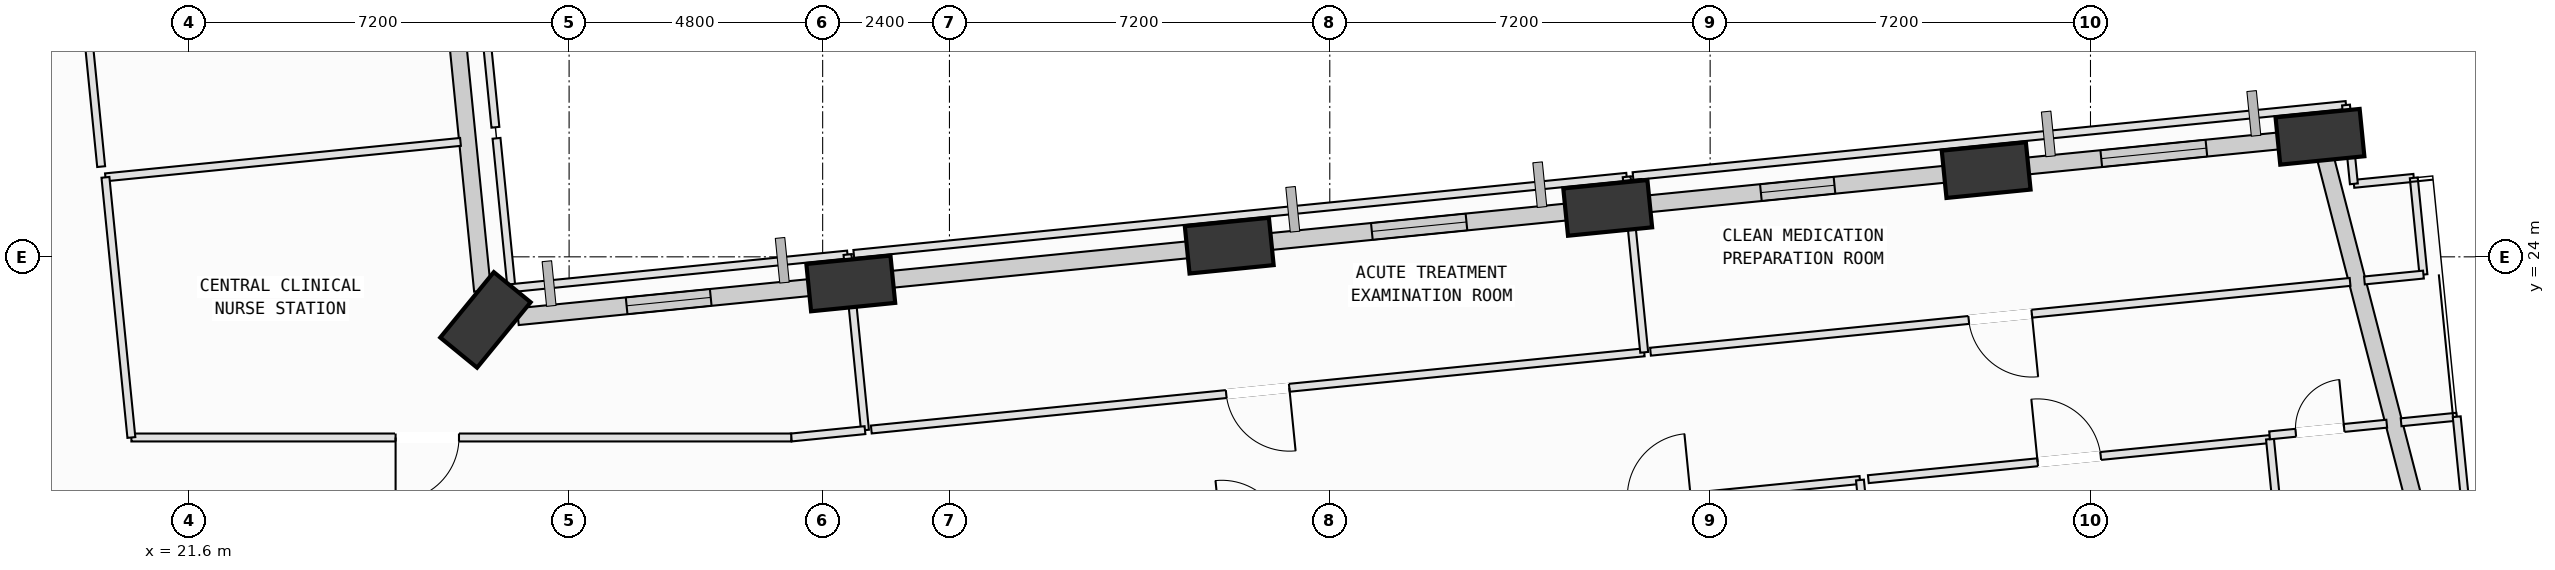
"""IFC4 building model, lengths in metres.
Left out: names, types, materials, properties, quantities, classifications, styles, units other than length and angle.
Written with IfcOpenShell. Run it as: python <this file> out.ifc"""

import sys

from ifc_helpers import new_model, si_unit, direction, frame, frame_2d, origin, origin_2d, place, context, subcontext, project, spatial, rectangle, extrude, element, fill, save


model = new_model("IFC4")
c1 = context("Model", 3, precision=1e-05, world=origin(), true_north=direction((0.0, 1.0)))
c2 = subcontext(c1, "Body", "Model", "MODEL_VIEW")
j1 = project(units=[si_unit("LENGTHUNIT", "METRE"), si_unit("PLANEANGLEUNIT", "RADIAN")], contexts=[c1])
p1 = place(None, origin())
s1 = spatial("IfcSite", under=j1, at=p1, CompositionType="ELEMENT")
p2 = place(p1, origin())
s2 = spatial("IfcBuilding", under=s1, at=p2, CompositionType="ELEMENT")
p3 = place(p2, frame((0.0, 0.0, 47.0)))
s3 = spatial("IfcBuildingStorey", under=s2, at=p3, CompositionType="ELEMENT", Elevation=47.0)
p4 = place(p3, frame((61.944, 26.273, 0.002), z_axis=(-0.007037616646, 0.116606027529, 0.993153314597), x_axis=(-0.987305751047, -0.158406878966, 0.011602355177)))
e1 = element("IfcColumn", 1, at=p4, inside=s3, PredefinedType="COLUMN", context=c2, shape_type="SweptSolid", body=[
    extrude(rectangle(XDim=1.6, YDim=0.9, at=origin_2d()), origin(), (0.0, 0.0, 1.0), 4.024),
])
p5 = place(p3, frame((55.625, 25.642, 0.002), z_axis=(-0.004197545486, 0.090885984878, 0.995852458131), x_axis=(-0.989432855337, -0.144709945545, 0.009036395335)))
e2 = element("IfcColumn", 2, at=p5, inside=s3, PredefinedType="COLUMN", context=c2, shape_type="SweptSolid", body=[
    extrude(rectangle(XDim=1.6, YDim=0.9, at=origin_2d()), origin(), (0.0, 0.0, 1.0), 4.013),
])
p6 = place(p3, frame((48.461, 24.927, 0.002), z_axis=(-0.001036521292, 0.061459615457, 0.998109032767), x_axis=(-0.993242457555, -0.115897149318, 0.00610502167)))
e3 = element("IfcColumn", 3, at=p6, inside=s3, PredefinedType="COLUMN", context=c2, shape_type="SweptSolid", body=[
    extrude(rectangle(XDim=1.6, YDim=0.9, at=origin_2d()), origin(), (0.0, 0.0, 1.0), 4.004),
])
p7 = place(p3, frame((41.296, 24.212, 0.002), z_axis=(0.002198022253, 0.031871322671, 0.999489563472), x_axis=(-0.99952753356, -0.030571913774, 0.00317297069)))
e4 = element("IfcColumn", 4, at=p7, inside=s3, PredefinedType="COLUMN", context=c2, shape_type="SweptSolid", body=[
    extrude(rectangle(XDim=1.6, YDim=0.9, at=origin_2d()), origin(), (0.0, 0.0, 1.0), 3.999),
])
p8 = place(p3, frame((34.132, 23.496, 0.002), z_axis=(0.00537559583, 0.002260193701, 0.999982997102), x_axis=(-0.477226844935, 0.878779951426, 0.000579175574)))
e5 = element("IfcColumn", 5, at=p8, inside=s3, PredefinedType="COLUMN", context=c2, shape_type="SweptSolid", body=[
    extrude(rectangle(XDim=1.6, YDim=0.9, at=origin_2d()), origin(), (0.0, 0.0, 1.0), 3.997),
])
p9 = place(p3, frame((27.217, 22.806, 0.002), z_axis=(0.008487881416, -0.026379602675, 0.999615962473), x_axis=(0.366006606198, 0.930365147227, 0.021444277663)))
e6 = element("IfcColumn", 6, at=p9, inside=s3, PredefinedType="COLUMN", context=c2, shape_type="SweptSolid", body=[
    extrude(rectangle(XDim=1.6, YDim=0.9, at=origin_2d()), origin(), (0.0, 0.0, 1.0), 3.998),
])
p10 = place(p3, frame((62.038, 25.909, 0.0), z_axis=(0.0, 0.0, 1.0), x_axis=(0.250203731226, -0.968193210512, 0.0)))
e7 = element("IfcWall", 7, at=p10, inside=s3, PredefinedType="SOLIDWALL", context=c2, shape_type="SweptSolid", body=[
    extrude(rectangle(XDim=8.614, YDim=0.32, at=frame_2d((4.307, 0.0))), origin(), (0.0, 0.0, 1.0), 3.165),
])
p11 = place(p3, frame((56.212, 25.7, 0.0), z_axis=(0.0, 0.0, 1.0), x_axis=(0.995056197677, 0.099313460641, 0.0)))
e8 = element("IfcWall", 8, at=p11, inside=s3, PredefinedType="SOLIDWALL", context=c2, shape_type="SweptSolid", body=[
    extrude(rectangle(XDim=5.209, YDim=0.32, at=frame_2d((2.604, 0.0))), origin(), (0.0, 0.0, 1.0), 3.165),
])
p12 = place(p11, frame((1.6, 0.0, 0.75)))
e9 = element("IfcOpeningElement", 9, at=p12, cuts=e8, PredefinedType="OPENING", context=c2, shape_type="SweptSolid", body=[
    extrude(rectangle(XDim=2.0, YDim=1.95, at=frame_2d((1.0, 0.975))), frame((0.0, 0.17, 0.0), z_axis=(0.0, -1.0, 0.0), x_axis=(1.0, 0.0, 0.0)), (0.0, 0.0, 1.0), 0.34),
])
p13 = place(p3, frame((49.063, 24.987, 0.0), z_axis=(0.0, 0.0, 1.0), x_axis=(0.995054829074, 0.099327172194, 0.0)))
e10 = element("IfcWall", 10, at=p13, inside=s3, PredefinedType="SOLIDWALL", context=c2, shape_type="SweptSolid", body=[
    extrude(rectangle(XDim=6.024, YDim=0.32, at=frame_2d((3.012, 0.0))), origin(), (0.0, 0.0, 1.0), 3.165),
])
p14 = place(p13, frame((2.309, 0.0, 0.75)))
e11 = element("IfcOpeningElement", 11, at=p14, cuts=e10, PredefinedType="OPENING", context=c2, shape_type="SweptSolid", body=[
    extrude(rectangle(XDim=1.4, YDim=1.85, at=frame_2d((0.7, 0.925))), frame((0.0, 0.17, 0.0), z_axis=(0.0, -1.0, 0.0), x_axis=(1.0, 0.0, 0.0)), (0.0, 0.0, 1.0), 0.34),
])
p15 = place(p3, frame((41.909, 24.273, 0.0), z_axis=(0.0, 0.0, 1.0), x_axis=(0.995058520891, 0.099290180795, 0.0)))
e12 = element("IfcWall", 12, at=p15, inside=s3, PredefinedType="SOLIDWALL", context=c2, shape_type="SweptSolid", body=[
    extrude(rectangle(XDim=6.0, YDim=0.32, at=frame_2d((3.0, 0.0))), origin(), (0.0, 0.0, 1.0), 3.165),
])
p16 = place(p15, frame((2.098, 0.0, 0.75)))
e13 = element("IfcOpeningElement", 13, at=p16, cuts=e12, PredefinedType="OPENING", context=c2, shape_type="SweptSolid", body=[
    extrude(rectangle(XDim=1.8, YDim=2.05, at=frame_2d((0.9, 1.025))), frame((0.0, 0.17, 0.0), z_axis=(0.0, -1.0, 0.0), x_axis=(1.0, 0.0, 0.0)), (0.0, 0.0, 1.0), 0.34),
])
p17 = place(p3, frame((34.748, 23.558, 0.0), z_axis=(0.0, 0.0, 1.0), x_axis=(0.995054132768, 0.099334147505, 0.0)))
e14 = element("IfcWall", 14, at=p17, inside=s3, PredefinedType="SOLIDWALL", context=c2, shape_type="SweptSolid", body=[
    extrude(rectangle(XDim=5.987, YDim=0.32, at=frame_2d((2.994, 0.0))), origin(), (0.0, 0.0, 1.0), 3.165),
])
p18 = place(p3, frame((27.831, 22.867, 0.0), z_axis=(0.0, 0.0, 1.0), x_axis=(0.995057817693, 0.099297227797, 0.0)))
e15 = element("IfcWall", 15, at=p18, inside=s3, PredefinedType="SOLIDWALL", context=c2, shape_type="SweptSolid", body=[
    extrude(rectangle(XDim=5.736, YDim=0.32, at=frame_2d((2.868, 0.0))), origin(), (0.0, 0.0, 1.0), 3.165),
])
p19 = place(p18, frame((2.069, 0.0, 0.75)))
e16 = element("IfcOpeningElement", 16, at=p19, cuts=e15, PredefinedType="OPENING", context=c2, shape_type="SweptSolid", body=[
    extrude(rectangle(XDim=1.6, YDim=1.95, at=frame_2d((0.8, 0.975))), frame((0.0, 0.17, 0.0), z_axis=(0.0, -1.0, 0.0), x_axis=(1.0, 0.0, 0.0)), (0.0, 0.0, 1.0), 0.34),
])
p20 = place(p3, frame((27.162, 23.357, 0.0), z_axis=(0.0, 0.0, 1.0), x_axis=(-0.099359482889, 0.995051603265, 0.0)))
e17 = element("IfcWall", 17, at=p20, inside=s3, PredefinedType="SOLIDWALL", context=c2, shape_type="SweptSolid", body=[
    extrude(rectangle(XDim=6.536, YDim=0.32, at=frame_2d((3.268, 0.0))), origin(), (0.0, 0.0, 1.0), 3.165),
])
p21 = place(p3, frame((45.634, 19.017, 0.0), z_axis=(0.0, 0.0, 1.0), x_axis=(0.995068149401, 0.099193639146, 0.0)))
e18 = element("IfcWall", 18, at=p21, inside=s3, PredefinedType="PARTITIONING", context=c2, shape_type="SweptSolid", body=[
    extrude(rectangle(XDim=7.64, YDim=0.15, at=frame_2d((3.82, 0.0))), origin(), (0.0, 0.0, 1.0), 3.78),
])
p22 = place(p21, frame((3.22, 0.0, 0.0)))
e19 = element("IfcOpeningElement", 19, at=p22, cuts=e18, PredefinedType="OPENING", context=c2, shape_type="SweptSolid", body=[
    extrude(rectangle(XDim=1.2, YDim=2.15, at=frame_2d((0.6, 1.075))), frame((0.0, 0.085, 0.0), z_axis=(0.0, -1.0, 0.0), x_axis=(1.0, 0.0, 0.0)), (0.0, 0.0, 1.0), 0.17),
])
p23 = place(p3, frame((53.236, 19.775, 0.0), z_axis=(0.0, 0.0, 1.0), x_axis=(0.099355848427, -0.995051966172, 0.0)))
e20 = element("IfcWall", 20, at=p23, inside=s3, PredefinedType="PARTITIONING", context=c2, shape_type="SweptSolid", body=[
    extrude(rectangle(XDim=15.53, YDim=0.15, at=frame_2d((7.765, 0.0))), origin(), (0.0, 0.0, 1.0), 3.78),
])
p24 = place(p3, frame((53.395, 19.791, 0.0), z_axis=(0.0, 0.0, 1.0), x_axis=(0.995053627219, 0.09933921158, 0.0)))
e21 = element("IfcWall", 21, at=p24, inside=s3, PredefinedType="PARTITIONING", context=c2, shape_type="SweptSolid", body=[
    extrude(rectangle(XDim=7.641, YDim=0.15, at=frame_2d((3.82, 0.0))), origin(), (0.0, 0.0, 1.0), 3.78),
])
p25 = place(p24, frame((3.22, 0.0, 0.0)))
e22 = element("IfcOpeningElement", 22, at=p25, cuts=e21, PredefinedType="OPENING", context=c2, shape_type="SweptSolid", body=[
    extrude(rectangle(XDim=1.2, YDim=2.15, at=frame_2d((0.6, 1.075))), frame((0.0, 0.085, 0.0), z_axis=(0.0, -1.0, 0.0), x_axis=(1.0, 0.0, 0.0)), (0.0, 0.0, 1.0), 0.17),
])
p26 = place(p3, frame((60.998, 20.55, 0.0), z_axis=(0.0, 0.0, 1.0), x_axis=(0.099315425298, -0.995056001589, 0.0)))
e23 = element("IfcWall", 23, at=p26, inside=s3, PredefinedType="PARTITIONING", context=c2, shape_type="SweptSolid", body=[
    extrude(rectangle(XDim=14.378, YDim=0.15, at=frame_2d((7.189, 0.0))), origin(), (0.0, 0.0, 1.0), 3.78),
])
p27 = place(p3, frame((20.023, 25.505, 0.0), z_axis=(0.0, 0.0, 1.0), x_axis=(0.995051137618, 0.099364146075, 0.0)))
e24 = element("IfcWall", 24, at=p27, inside=s3, PredefinedType="PARTITIONING", context=c2, shape_type="SweptSolid", body=[
    extrude(rectangle(XDim=6.754, YDim=0.15, at=frame_2d((3.377, 0.0))), origin(), (0.0, 0.0, 1.0), 3.78),
])
p28 = place(p3, frame((27.426, 26.244, 0.0), z_axis=(0.0, 0.0, 1.0), x_axis=(0.099283198449, -0.995059217587, 0.0)))
e25 = element("IfcWall", 25, at=p28, inside=s3, PredefinedType="PARTITIONING", context=c2, shape_type="SweptSolid", body=[
    extrude(rectangle(XDim=2.85, YDim=0.15, at=frame_2d((1.425, 0.0))), origin(), (0.0, 0.0, 1.0), 3.78),
])
p29 = place(p3, frame((27.709, 23.408, 0.0), z_axis=(0.0, 0.0, 1.0), x_axis=(0.995054191243, 0.099333561751, 0.0)))
e26 = element("IfcWall", 26, at=p29, inside=s3, PredefinedType="PARTITIONING", context=c2, shape_type="SweptSolid", body=[
    extrude(rectangle(XDim=6.393, YDim=0.15, at=frame_2d((3.196, 0.0))), origin(), (0.0, 0.0, 1.0), 3.78),
])
p30 = place(p3, frame((34.07, 24.043, 0.0), z_axis=(0.0, 0.0, 1.0), x_axis=(0.099033343843, -0.995084115443, 0.0)))
e27 = element("IfcWall", 27, at=p30, inside=s3, PredefinedType="PARTITIONING", context=c2, shape_type="SweptSolid", body=[
    extrude(rectangle(XDim=3.34, YDim=0.15, at=frame_2d((1.67, 0.0))), origin(), (0.0, 0.0, 1.0), 2.865),
])
p31 = place(p3, frame((34.401, 20.719, 0.0), z_axis=(0.0, 0.0, 1.0), x_axis=(-0.995085318307, -0.099021256754, 0.0)))
e28 = element("IfcWall", 28, at=p31, inside=s3, PredefinedType="PARTITIONING", context=c2, shape_type="SweptSolid", body=[
    extrude(rectangle(XDim=1.403, YDim=0.15, at=frame_2d((0.701, 0.0))), origin(), (0.0, 0.0, 1.0), 3.78),
])
p32 = place(p3, frame((33.005, 20.58, 0.0), z_axis=(0.0, 0.0, 1.0), x_axis=(-1.0, 0.0, 0.0)))
e29 = element("IfcWall", 29, at=p32, inside=s3, PredefinedType="PARTITIONING", context=c2, shape_type="SweptSolid", body=[
    extrude(rectangle(XDim=12.491, YDim=0.15, at=frame_2d((6.246, 0.0))), origin(), (0.0, 0.0, 1.0), 3.78),
])
p33 = place(p32, frame((6.289, 0.0, 0.0)))
e30 = element("IfcOpeningElement", 30, at=p33, cuts=e29, PredefinedType="OPENING", context=c2, shape_type="SweptSolid", body=[
    extrude(rectangle(XDim=1.2, YDim=2.15, at=frame_2d((0.6, 1.075))), frame((0.0, 0.085, 0.0), z_axis=(0.0, -1.0, 0.0), x_axis=(1.0, 0.0, 0.0)), (0.0, 0.0, 1.0), 0.17),
])
p34 = place(p3, frame((20.514, 20.58, 0.0), z_axis=(0.0, 0.0, 1.0), x_axis=(-0.099200901867, 0.995067425388, 0.0)))
e31 = element("IfcWall", 31, at=p34, inside=s3, PredefinedType="PARTITIONING", context=c2, shape_type="SweptSolid", body=[
    extrude(rectangle(XDim=4.949, YDim=0.15, at=frame_2d((2.475, 0.0))), origin(), (0.0, 0.0, 1.0), 3.78),
])
p35 = place(p3, frame((49.152, 22.192, 0.0), z_axis=(0.0, 0.0, 1.0), x_axis=(-0.995051810564, -0.099357406838, 0.0)))
e32 = element("IfcWall", 32, at=p35, inside=s3, PredefinedType="PARTITIONING", context=c2, shape_type="SweptSolid", body=[
    extrude(rectangle(XDim=14.704, YDim=0.15, at=frame_2d((7.352, 0.0))), origin(), (0.0, 0.0, 1.0), 3.78),
])
p36 = place(p35, frame((6.752, 0.0, 0.0)))
e33 = element("IfcOpeningElement", 33, at=p36, cuts=e32, PredefinedType="OPENING", context=c2, shape_type="SweptSolid", body=[
    extrude(rectangle(XDim=1.2, YDim=2.15, at=frame_2d((0.6, 1.075))), frame((0.0, 0.085, 0.0), z_axis=(0.0, -1.0, 0.0), x_axis=(1.0, 0.0, 0.0)), (0.0, 0.0, 1.0), 0.17),
])
p37 = place(p3, frame((34.189, 24.055, 0.0), z_axis=(0.0, 0.0, 1.0), x_axis=(0.995058374642, 0.099291646454, 0.0)))
e34 = element("IfcWall", 34, at=p37, inside=s3, PredefinedType="PARTITIONING", context=c2, shape_type="SweptSolid", body=[
    extrude(rectangle(XDim=14.704, YDim=0.15, at=frame_2d((7.352, 0.0))), origin(), (0.0, 0.0, 1.0), 3.165),
])
p38 = place(p3, frame((48.82, 25.515, 0.0), z_axis=(0.0, 0.0, 1.0), x_axis=(0.099424098356, -0.995045149059, 0.0)))
e35 = element("IfcWall", 35, at=p38, inside=s3, PredefinedType="PARTITIONING", context=c2, shape_type="SweptSolid", body=[
    extrude(rectangle(XDim=3.34, YDim=0.15, at=frame_2d((1.67, 0.0))), origin(), (0.0, 0.0, 1.0), 3.78),
])
p39 = place(p3, frame((62.586, 25.382, 0.0), z_axis=(0.0, 0.0, 1.0), x_axis=(0.995068954743, 0.099185559967, 0.0)))
e36 = element("IfcWall", 36, at=p39, inside=s3, PredefinedType="PARTITIONING", context=c2, shape_type="SweptSolid", body=[
    extrude(rectangle(XDim=1.14, YDim=0.15, at=frame_2d((0.57, 0.0))), origin(), (0.0, 0.0, 1.0), 3.78),
])
p40 = place(p3, frame((63.72, 25.495, 0.0), z_axis=(0.0, 0.0, 1.0), x_axis=(0.099503719021, -0.99503719021, 0.0)))
e37 = element("IfcWall", 37, at=p40, inside=s3, PredefinedType="PARTITIONING", context=c2, shape_type="SweptSolid", body=[
    extrude(rectangle(XDim=1.84, YDim=0.15, at=frame_2d((0.92, 0.0))), origin(), (0.0, 0.0, 1.0), 3.78),
])
p41 = place(p3, frame((63.903, 23.664, 0.0), z_axis=(0.0, 0.0, 1.0), x_axis=(-0.995093012323, -0.098943907475, 0.0)))
e38 = element("IfcWall", 38, at=p41, inside=s3, PredefinedType="PARTITIONING", context=c2, shape_type="SweptSolid", body=[
    extrude(rectangle(XDim=1.123, YDim=0.15, at=frame_2d((0.562, 0.0))), origin(), (0.0, 0.0, 1.0), 3.78),
])
p42 = place(p3, frame((62.514, 23.525, 0.0), z_axis=(0.0, 0.0, 1.0), x_axis=(-0.995063129281, -0.099243985941, 0.0)))
e39 = element("IfcWall", 39, at=p42, inside=s3, PredefinedType="PARTITIONING", context=c2, shape_type="SweptSolid", body=[
    extrude(rectangle(XDim=13.309, YDim=0.15, at=frame_2d((6.654, 0.0))), origin(), (0.0, 0.0, 1.0), 3.78),
])
p43 = place(p42, frame((6.054, 0.0, 0.0)))
e40 = element("IfcOpeningElement", 40, at=p43, cuts=e39, PredefinedType="OPENING", context=c2, shape_type="SweptSolid", body=[
    extrude(rectangle(XDim=1.2, YDim=2.15, at=frame_2d((0.6, 1.075))), frame((0.0, 0.085, 0.0), z_axis=(0.0, -1.0, 0.0), x_axis=(1.0, 0.0, 0.0)), (0.0, 0.0, 1.0), 0.17),
])
p44 = place(p3, frame((48.94, 25.527, 0.0), z_axis=(0.0, 0.0, 1.0), x_axis=(0.995057485189, 0.09930055976, 0.0)))
e41 = element("IfcWall", 41, at=p44, inside=s3, PredefinedType="PARTITIONING", context=c2, shape_type="SweptSolid", body=[
    extrude(rectangle(XDim=13.564, YDim=0.15, at=frame_2d((6.782, 0.0))), origin(), (0.0, 0.0, 1.0), 3.165),
])
p45 = place(p3, frame((62.437, 26.874, 0.0), z_axis=(0.0, 0.0, 1.0), x_axis=(0.099326377698, -0.995054908381, 0.0)))
e42 = element("IfcWall", 42, at=p45, inside=s3, PredefinedType="PARTITIONING", context=c2, shape_type="SweptSolid", body=[
    extrude(rectangle(XDim=1.499, YDim=0.15, at=frame_2d((0.75, 0.0))), origin(), (0.0, 0.0, 1.0), 3.165),
])
p46 = place(p3, frame((19.942, 25.708, 0.0), z_axis=(0.0, 0.0, 1.0), x_axis=(-0.099208101616, 0.9950667076, 0.0)))
e43 = element("IfcWall", 43, at=p46, inside=s3, PredefinedType="PARTITIONING", context=c2, shape_type="SweptSolid", body=[
    extrude(rectangle(XDim=6.46, YDim=0.15, at=frame_2d((3.23, 0.0))), origin(), (0.0, 0.0, 1.0), 3.78),
])
p47 = place(p46, frame((2.63, 0.0, 0.0)))
e44 = element("IfcOpeningElement", 44, at=p47, cuts=e43, PredefinedType="OPENING", context=c2, shape_type="SweptSolid", body=[
    extrude(rectangle(XDim=1.2, YDim=2.15, at=frame_2d((0.6, 1.075))), frame((0.0, 0.085, 0.0), z_axis=(0.0, -1.0, 0.0), x_axis=(1.0, 0.0, 0.0)), (0.0, 0.0, 1.0), 0.17),
])
p48 = place(p3, frame((26.764, 32.881, 0.0), z_axis=(0.0, 0.0, 1.0), x_axis=(0.099241790824, -0.995063348212, 0.0)))
e45 = element("IfcWall", 45, at=p48, inside=s3, PredefinedType="PARTITIONING", context=c2, shape_type="SweptSolid", body=[
    extrude(rectangle(XDim=6.46, YDim=0.15, at=frame_2d((3.23, 0.0))), origin(), (0.0, 0.0, 1.0), 3.78),
])
p49 = place(p3, frame((60.991, 20.62, 0.0), z_axis=(0.0, 0.0, 1.0), x_axis=(0.995070765983, 0.099167387206, 0.0)))
e46 = element("IfcWall", 46, at=p49, inside=s3, PredefinedType="PARTITIONING", context=c2, shape_type="SweptSolid", body=[
    extrude(rectangle(XDim=2.228, YDim=0.15, at=frame_2d((1.114, 0.0))), origin(), (0.0, 0.0, 1.0), 3.78),
])
p50 = place(p49, frame((0.497, 0.0, 0.0)))
e47 = element("IfcOpeningElement", 47, at=p50, cuts=e46, PredefinedType="OPENING", context=c2, shape_type="SweptSolid", body=[
    extrude(rectangle(XDim=0.92, YDim=2.1, at=frame_2d((0.46, 1.05))), frame((0.0, 0.085, 0.0), z_axis=(0.0, -1.0, 0.0), x_axis=(1.0, 0.0, 0.0)), (0.0, 0.0, 1.0), 0.17),
])
p51 = place(p3, frame((63.48, 20.868, 0.0), z_axis=(0.0, 0.0, 1.0), x_axis=(0.995066841681, 0.099206756764, 0.0)))
e48 = element("IfcWall", 48, at=p51, inside=s3, PredefinedType="PARTITIONING", context=c2, shape_type="SweptSolid", body=[
    extrude(rectangle(XDim=1.058, YDim=0.15, at=frame_2d((0.529, 0.0))), origin(), (0.0, 0.0, 1.0), 3.78),
])
p52 = place(p3, frame((64.533, 20.973, 0.0), z_axis=(0.0, 0.0, 1.0), x_axis=(0.099301654273, -0.995057375963, 0.0)))
e49 = element("IfcWall", 49, at=p52, inside=s3, PredefinedType="PARTITIONING", context=c2, shape_type="SweptSolid", body=[
    extrude(rectangle(XDim=12.92, YDim=0.15, at=frame_2d((6.46, 0.0))), origin(), (0.0, 0.0, 1.0), 3.165),
])
p53 = place(p12, origin())
e50 = element("IfcWindow", 50, at=p53, inside=s3, PartitioningType="SINGLE_PANEL", PredefinedType="WINDOW", context=c2, shape_type="SweptSolid", body=[
    extrude(rectangle(XDim=2.0, YDim=1.95, at=frame_2d((1.0, 0.975))), frame((0.0, 0.03, 0.0), z_axis=(0.0, -1.0, 0.0), x_axis=(1.0, 0.0, 0.0)), (0.0, 0.0, 1.0), 0.06),
])
fill(e9, e50)
p54 = place(p14, origin())
e51 = element("IfcWindow", 51, at=p54, inside=s3, PartitioningType="SINGLE_PANEL", PredefinedType="WINDOW", context=c2, shape_type="SweptSolid", body=[
    extrude(rectangle(XDim=1.4, YDim=1.85, at=frame_2d((0.7, 0.925))), frame((0.0, 0.03, 0.0), z_axis=(0.0, -1.0, 0.0), x_axis=(1.0, 0.0, 0.0)), (0.0, 0.0, 1.0), 0.06),
])
fill(e11, e51)
p55 = place(p16, origin())
e52 = element("IfcWindow", 52, at=p55, inside=s3, PartitioningType="SINGLE_PANEL", PredefinedType="WINDOW", context=c2, shape_type="SweptSolid", body=[
    extrude(rectangle(XDim=1.8, YDim=2.05, at=frame_2d((0.9, 1.025))), frame((0.0, 0.03, 0.0), z_axis=(0.0, -1.0, 0.0), x_axis=(1.0, 0.0, 0.0)), (0.0, 0.0, 1.0), 0.06),
])
fill(e13, e52)
p56 = place(p19, origin())
e53 = element("IfcWindow", 53, at=p56, inside=s3, PartitioningType="SINGLE_PANEL", PredefinedType="WINDOW", context=c2, shape_type="SweptSolid", body=[
    extrude(rectangle(XDim=1.6, YDim=1.95, at=frame_2d((0.8, 0.975))), frame((0.0, 0.03, 0.0), z_axis=(0.0, -1.0, 0.0), x_axis=(1.0, 0.0, 0.0)), (0.0, 0.0, 1.0), 0.06),
])
fill(e16, e53)
p57 = place(p25, origin())
e54 = element("IfcDoor", 54, at=p57, inside=s3, OperationType="SINGLE_SWING_LEFT", PredefinedType="DOOR", context=c2, shape_type="SweptSolid", body=[
    extrude(rectangle(XDim=1.2, YDim=2.15, at=frame_2d((0.6, 1.075))), frame((0.0, 0.025, 0.0), z_axis=(0.0, -1.0, 0.0), x_axis=(1.0, 0.0, 0.0)), (0.0, 0.0, 1.0), 0.05),
])
fill(e22, e54)
p58 = place(p33, origin())
e55 = element("IfcDoor", 55, at=p58, inside=s3, OperationType="SINGLE_SWING_RIGHT", PredefinedType="DOOR", context=c2, shape_type="SweptSolid", body=[
    extrude(rectangle(XDim=1.2, YDim=2.15, at=frame_2d((0.6, 1.075))), frame((0.0, 0.025, 0.0), z_axis=(0.0, -1.0, 0.0), x_axis=(1.0, 0.0, 0.0)), (0.0, 0.0, 1.0), 0.05),
])
fill(e30, e55)
p59 = place(p36, origin())
e56 = element("IfcDoor", 56, at=p59, inside=s3, OperationType="SINGLE_SWING_LEFT", PredefinedType="DOOR", context=c2, shape_type="SweptSolid", body=[
    extrude(rectangle(XDim=1.2, YDim=2.15, at=frame_2d((0.6, 1.075))), frame((0.0, 0.025, 0.0), z_axis=(0.0, -1.0, 0.0), x_axis=(1.0, 0.0, 0.0)), (0.0, 0.0, 1.0), 0.05),
])
fill(e33, e56)
p60 = place(p43, origin())
e57 = element("IfcDoor", 57, at=p60, inside=s3, OperationType="SINGLE_SWING_LEFT", PredefinedType="DOOR", context=c2, shape_type="SweptSolid", body=[
    extrude(rectangle(XDim=1.2, YDim=2.15, at=frame_2d((0.6, 1.075))), frame((0.0, 0.025, 0.0), z_axis=(0.0, -1.0, 0.0), x_axis=(1.0, 0.0, 0.0)), (0.0, 0.0, 1.0), 0.05),
])
fill(e40, e57)
p61 = place(p50, origin())
e58 = element("IfcDoor", 58, at=p61, inside=s3, OperationType="SINGLE_SWING_RIGHT", PredefinedType="DOOR", context=c2, shape_type="SweptSolid", body=[
    extrude(rectangle(XDim=0.92, YDim=2.1, at=frame_2d((0.46, 1.05))), frame((0.0, 0.025, 0.0), z_axis=(0.0, -1.0, 0.0), x_axis=(1.0, 0.0, 0.0)), (0.0, 0.0, 1.0), 0.05),
])
fill(e47, e58)
save(model, sys.argv[1])
